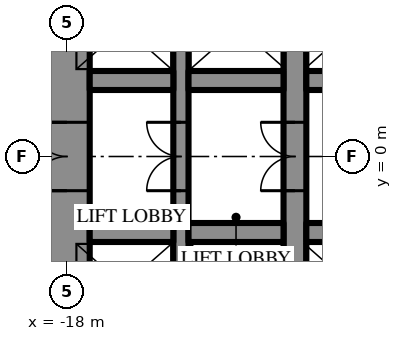
"""IFC4 building model, lengths in metres.
Left out: names, types, materials, properties, quantities, classifications, styles, units other than length and angle.
Written with IfcOpenShell. Run it as: python <this file> out.ifc"""

import sys

from ifc_helpers import new_model, si_unit, direction, frame, frame_2d, origin, place, context, subcontext, project, spatial, rectangle, extrude, element, fill, save


model = new_model("IFC4")
c1 = context("Model", 3, precision=1e-05, world=origin(), true_north=direction((0.0, 1.0)))
c2 = subcontext(c1, "Body", "Model", "MODEL_VIEW")
j1 = project(units=[si_unit("LENGTHUNIT", "METRE"), si_unit("PLANEANGLEUNIT", "RADIAN")], contexts=[c1])
p1 = place(None, origin())
s1 = spatial("IfcSite", under=j1, at=p1, CompositionType="ELEMENT")
p2 = place(p1, origin())
s2 = spatial("IfcBuilding", under=s1, at=p2, CompositionType="ELEMENT")
p3 = place(p2, frame((0.0, 0.0, 82.3)))
s3 = spatial("IfcBuildingStorey", under=s2, at=p3, CompositionType="ELEMENT", Elevation=82.3)
p4 = place(p3, frame((-18.0, 10.7, 0.0), z_axis=(0.0, 0.0, 1.0), x_axis=(0.0, -1.0, 0.0)))
e1 = element("IfcWall", 1, at=p4, inside=s3, PredefinedType="SHEAR", context=c2, shape_type="SweptSolid", body=[
    extrude(rectangle(XDim=21.4, YDim=1.2, at=frame_2d((10.7, 0.0))), origin(), (0.0, 0.0, 1.0), 4.2),
])
p5 = place(p4, frame((9.8, 0.0, 0.0)))
e2 = element("IfcOpeningElement", 2, at=p5, cuts=e1, PredefinedType="OPENING", context=c2, shape_type="SweptSolid", body=[
    extrude(rectangle(XDim=1.8, YDim=2.4, at=frame_2d((0.9, 1.2))), frame((0.0, 0.61, 0.0), z_axis=(0.0, -1.0, 0.0), x_axis=(1.0, 0.0, 0.0)), (0.0, 0.0, 1.0), 1.22),
])
p6 = place(p3, frame((-12.0, -10.7, 0.0), z_axis=(0.0, 0.0, 1.0), x_axis=(0.0, 1.0, 0.0)))
e3 = element("IfcWall", 3, at=p6, inside=s3, PredefinedType="SHEAR", context=c2, shape_type="SweptSolid", body=[
    extrude(rectangle(XDim=21.4, YDim=0.6, at=frame_2d((10.7, 0.0))), origin(), (0.0, 0.0, 1.0), 4.2),
])
p7 = place(p6, frame((9.8, 0.0, 0.0)))
e4 = element("IfcOpeningElement", 4, at=p7, cuts=e3, PredefinedType="OPENING", context=c2, shape_type="SweptSolid", body=[
    extrude(rectangle(XDim=1.8, YDim=2.4, at=frame_2d((0.9, 1.2))), frame((0.0, 0.31, 0.0), z_axis=(0.0, -1.0, 0.0), x_axis=(1.0, 0.0, 0.0)), (0.0, 0.0, 1.0), 0.62),
])
p8 = place(p3, frame((-15.0, -10.7, 0.0), z_axis=(0.0, 0.0, 1.0), x_axis=(0.0, 1.0, 0.0)))
e5 = element("IfcWall", 5, at=p8, inside=s3, PredefinedType="SHEAR", context=c2, shape_type="SweptSolid", body=[
    extrude(rectangle(XDim=21.4, YDim=0.4, at=frame_2d((10.7, 0.0))), origin(), (0.0, 0.0, 1.0), 4.2),
])
p9 = place(p8, frame((9.8, 0.0, 0.0)))
e6 = element("IfcOpeningElement", 6, at=p9, cuts=e5, PredefinedType="OPENING", context=c2, shape_type="SweptSolid", body=[
    extrude(rectangle(XDim=1.8, YDim=2.4, at=frame_2d((0.9, 1.2))), frame((0.0, 0.21, 0.0), z_axis=(0.0, -1.0, 0.0), x_axis=(1.0, 0.0, 0.0)), (0.0, 0.0, 1.0), 0.42),
])
p10 = place(p3, frame((-17.4, 2.0, 0.0), z_axis=(0.0, 0.0, 1.0), x_axis=(1.0, 0.0, 0.0)))
e7 = element("IfcWall", 7, at=p10, inside=s3, PredefinedType="SHEAR", context=c2, shape_type="SweptSolid", body=[
    extrude(rectangle(XDim=2.2, YDim=0.5, at=frame_2d((1.1, 0.0))), origin(), (0.0, 0.0, 1.0), 4.2),
])
p11 = place(p3, frame((-14.8, 2.0, 0.0), z_axis=(0.0, 0.0, 1.0), x_axis=(1.0, 0.0, 0.0)))
e8 = element("IfcWall", 8, at=p11, inside=s3, PredefinedType="SHEAR", context=c2, shape_type="SweptSolid", body=[
    extrude(rectangle(XDim=2.5, YDim=0.5, at=frame_2d((1.25, 0.0))), origin(), (0.0, 0.0, 1.0), 4.2),
])
p12 = place(p3, frame((-11.7, 2.0, 0.0), z_axis=(0.0, 0.0, 1.0), x_axis=(1.0, 0.0, 0.0)))
e9 = element("IfcWall", 9, at=p12, inside=s3, PredefinedType="SHEAR", context=c2, shape_type="SweptSolid", body=[
    extrude(rectangle(XDim=5.9, YDim=0.5, at=frame_2d((2.95, 0.0))), origin(), (0.0, 0.0, 1.0), 4.2),
])
p13 = place(p3, frame((3.2, -2.0, 0.0), z_axis=(0.0, 0.0, 1.0), x_axis=(-1.0, 0.0, 0.0)))
e10 = element("IfcWall", 10, at=p13, inside=s3, PredefinedType="SHEAR", context=c2, shape_type="SweptSolid", body=[
    extrude(rectangle(XDim=14.9, YDim=0.5, at=frame_2d((7.45, 0.0))), origin(), (0.0, 0.0, 1.0), 4.2),
])
p14 = place(p13, frame((1.15, 0.0, 0.0)))
e11 = element("IfcOpeningElement", 11, at=p14, cuts=e10, PredefinedType="OPENING", context=c2, shape_type="SweptSolid", body=[
    extrude(rectangle(XDim=1.1, YDim=2.2, at=frame_2d((0.55, 1.1))), frame((0.0, 0.26, 0.0), z_axis=(0.0, -1.0, 0.0), x_axis=(1.0, 0.0, 0.0)), (0.0, 0.0, 1.0), 0.52),
])
p15 = place(p13, frame((4.15, 0.0, 0.0)))
e12 = element("IfcOpeningElement", 12, at=p15, cuts=e10, PredefinedType="OPENING", context=c2, shape_type="SweptSolid", body=[
    extrude(rectangle(XDim=1.1, YDim=2.2, at=frame_2d((0.55, 1.1))), frame((0.0, 0.26, 0.0), z_axis=(0.0, -1.0, 0.0), x_axis=(1.0, 0.0, 0.0)), (0.0, 0.0, 1.0), 0.52),
])
p16 = place(p13, frame((7.15, 0.0, 0.0)))
e13 = element("IfcOpeningElement", 13, at=p16, cuts=e10, PredefinedType="OPENING", context=c2, shape_type="SweptSolid", body=[
    extrude(rectangle(XDim=1.1, YDim=2.2, at=frame_2d((0.55, 1.1))), frame((0.0, 0.26, 0.0), z_axis=(0.0, -1.0, 0.0), x_axis=(1.0, 0.0, 0.0)), (0.0, 0.0, 1.0), 0.52),
])
p17 = place(p13, frame((10.15, 0.0, 0.0)))
e14 = element("IfcOpeningElement", 14, at=p17, cuts=e10, PredefinedType="OPENING", context=c2, shape_type="SweptSolid", body=[
    extrude(rectangle(XDim=1.1, YDim=2.2, at=frame_2d((0.55, 1.1))), frame((0.0, 0.26, 0.0), z_axis=(0.0, -1.0, 0.0), x_axis=(1.0, 0.0, 0.0)), (0.0, 0.0, 1.0), 0.52),
])
p18 = place(p3, frame((-12.3, -2.0, 0.0), z_axis=(0.0, 0.0, 1.0), x_axis=(-1.0, 0.0, 0.0)))
e15 = element("IfcWall", 15, at=p18, inside=s3, PredefinedType="SHEAR", context=c2, shape_type="SweptSolid", body=[
    extrude(rectangle(XDim=2.5, YDim=0.5, at=frame_2d((1.25, 0.0))), origin(), (0.0, 0.0, 1.0), 4.2),
])
p19 = place(p3, frame((-15.2, -2.0, 0.0), z_axis=(0.0, 0.0, 1.0), x_axis=(-1.0, 0.0, 0.0)))
e16 = element("IfcWall", 16, at=p19, inside=s3, PredefinedType="SHEAR", context=c2, shape_type="SweptSolid", body=[
    extrude(rectangle(XDim=2.2, YDim=0.5, at=frame_2d((1.1, 0.0))), origin(), (0.0, 0.0, 1.0), 4.2),
])
p20 = place(p5, frame((1.8, 0.0, 0.0), z_axis=(0.0, 0.0, 1.0), x_axis=(-1.0, 0.0, 0.0)))
e17 = element("IfcDoor", 17, at=p20, inside=s3, OperationType="DOUBLE_DOOR_SINGLE_SWING", PredefinedType="DOOR", context=c2, shape_type="SweptSolid", body=[
    extrude(rectangle(XDim=1.8, YDim=2.4, at=frame_2d((0.9, 1.2))), frame((0.0, 0.025, 0.0), z_axis=(0.0, -1.0, 0.0), x_axis=(1.0, 0.0, 0.0)), (0.0, 0.0, 1.0), 0.05),
])
fill(e2, e17)
p21 = place(p7, origin())
e18 = element("IfcDoor", 18, at=p21, inside=s3, OperationType="DOUBLE_DOOR_SINGLE_SWING", PredefinedType="DOOR", context=c2, shape_type="SweptSolid", body=[
    extrude(rectangle(XDim=1.8, YDim=2.4, at=frame_2d((0.9, 1.2))), frame((0.0, 0.025, 0.0), z_axis=(0.0, -1.0, 0.0), x_axis=(1.0, 0.0, 0.0)), (0.0, 0.0, 1.0), 0.05),
])
fill(e4, e18)
p22 = place(p9, origin())
e19 = element("IfcDoor", 19, at=p22, inside=s3, OperationType="DOUBLE_DOOR_SINGLE_SWING", PredefinedType="DOOR", context=c2, shape_type="SweptSolid", body=[
    extrude(rectangle(XDim=1.8, YDim=2.4, at=frame_2d((0.9, 1.2))), frame((0.0, 0.025, 0.0), z_axis=(0.0, -1.0, 0.0), x_axis=(1.0, 0.0, 0.0)), (0.0, 0.0, 1.0), 0.05),
])
fill(e6, e19)
save(model, sys.argv[1])
